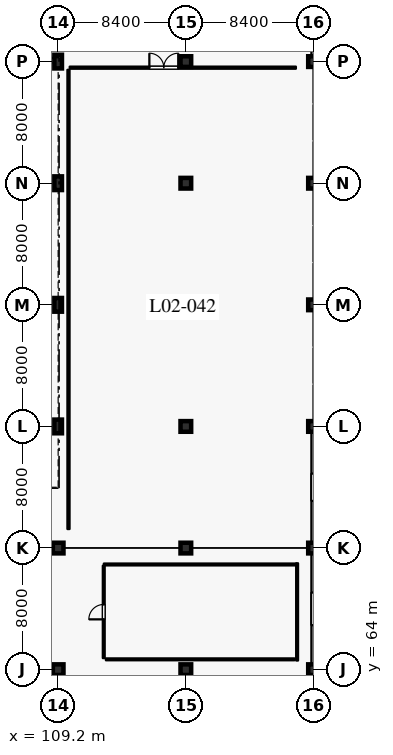
"""IFC4 building model, lengths in metres.
Left out: names, types, materials, properties, quantities, classifications, styles, units other than length and angle.
Written with IfcOpenShell. Run it as: python <this file> out.ifc"""

import sys

from ifc_helpers import new_model, si_unit, direction, frame, frame_2d, origin, origin_2d, place, context, subcontext, project, spatial, rectangle, hollow_rectangle, extrude, element, fill, save


model = new_model("IFC4")
c1 = context("Model", 3, precision=1e-05, world=origin(), true_north=direction((0.0, 1.0)))
c2 = subcontext(c1, "Body", "Model", "MODEL_VIEW")
j1 = project(units=[si_unit("LENGTHUNIT", "METRE"), si_unit("PLANEANGLEUNIT", "RADIAN")], contexts=[c1])
p1 = place(None, origin())
s1 = spatial("IfcSite", under=j1, at=p1, CompositionType="ELEMENT")
p2 = place(p1, origin())
s2 = spatial("IfcBuilding", under=s1, at=p2, CompositionType="ELEMENT")
p3 = place(p2, frame((0.0, 0.0, 11.4)))
s3 = spatial("IfcBuildingStorey", under=s2, at=p3, CompositionType="ELEMENT", Elevation=11.4)
for number, where, z_axis, x_axis in (
    (1, (109.2, 64.0, 0.0), (0.0, 0.0, 1.0), (1.0, 0.0, 0.0)),
    (2, (109.2, 72.0, 0.0), (0.0, 0.0, 1.0), (1.0, 0.0, 0.0)),
):
    element("IfcColumn", number, at=place(p3, frame(where, z_axis=z_axis, x_axis=x_axis)), inside=s3, PredefinedType="COLUMN", context=c2, shape_type="SweptSolid", body=[
        extrude(rectangle(XDim=0.7, YDim=0.7, at=origin_2d()), origin(), (0.0, 0.0, 1.0), 4.8),
    ])
for number, where, z_axis, x_axis in (
    (3, (109.2, 80.0, 0.0), (0.0, 0.0, 1.0), (1.0, 0.0, 0.0)),
    (4, (109.2, 88.0, 0.0), (0.0, 0.0, 1.0), (1.0, 0.0, 0.0)),
    (5, (109.2, 96.0, 0.0), (0.0, 0.0, 1.0), (1.0, 0.0, 0.0)),
    (6, (109.2, 104.0, 0.0), (0.0, 0.0, 1.0), (1.0, 0.0, 0.0)),
):
    element("IfcColumn", number, at=place(p3, frame(where, z_axis=z_axis, x_axis=x_axis)), inside=s3, PredefinedType="COLUMN", context=c2, shape_type="SweptSolid", body=[
        extrude(hollow_rectangle(XDim=0.5, YDim=0.9, WallThickness=0.024, at=origin_2d()), origin(), (0.0, 0.0, 1.0), 4.8),
    ])
for number, where, z_axis, x_axis in (
    (7, (117.6, 64.0, 0.0), (0.0, 0.0, 1.0), (1.0, 0.0, 0.0)),
    (8, (117.6, 72.0, 0.0), (0.0, 0.0, 1.0), (1.0, 0.0, 0.0)),
    (9, (117.6, 80.0, 0.0), (0.0, 0.0, 1.0), (1.0, 0.0, 0.0)),
    (10, (117.6, 88.0, 0.0), (0.0, 0.0, 1.0), (1.0, 0.0, 0.0)),
    (11, (117.6, 96.0, 0.0), (0.0, 0.0, 1.0), (1.0, 0.0, 0.0)),
    (12, (117.6, 104.0, 0.0), (0.0, 0.0, 1.0), (1.0, 0.0, 0.0)),
    (13, (126.0, 64.0, 0.0), (0.0, 0.0, 1.0), (1.0, 0.0, 0.0)),
    (14, (126.0, 72.0, 0.0), (0.0, 0.0, 1.0), (1.0, 0.0, 0.0)),
    (15, (126.0, 80.0, 0.0), (0.0, 0.0, 1.0), (1.0, 0.0, 0.0)),
    (16, (126.0, 88.0, 0.0), (0.0, 0.0, 1.0), (1.0, 0.0, 0.0)),
    (17, (126.0, 96.0, 0.0), (0.0, 0.0, 1.0), (1.0, 0.0, 0.0)),
    (18, (126.0, 104.0, 0.0), (0.0, 0.0, 1.0), (1.0, 0.0, 0.0)),
):
    element("IfcColumn", number, at=place(p3, frame(where, z_axis=z_axis, x_axis=x_axis)), inside=s3, PredefinedType="COLUMN", context=c2, shape_type="SweptSolid", body=[
        extrude(rectangle(XDim=0.7, YDim=0.7, at=origin_2d()), origin(), (0.0, 0.0, 1.0), 4.8),
    ])
p4 = place(p3, frame((126.0, 79.65, 0.0), z_axis=(0.0, 0.0, 1.0), x_axis=(0.0, -1.0, 0.0)))
e19 = element("IfcWall", 19, at=p4, inside=s3, PredefinedType="SOLIDWALL", context=c2, shape_type="SweptSolid", body=[
    extrude(rectangle(XDim=7.3, YDim=0.28, at=frame_2d((3.65, 0.0))), origin(), (0.0, 0.0, 1.0), 4.1),
])
p5 = place(p4, frame((2.75, 0.0, 1.05)))
e20 = element("IfcOpeningElement", 20, at=p5, cuts=e19, PredefinedType="OPENING", context=c2, shape_type="SweptSolid", body=[
    extrude(rectangle(XDim=1.8, YDim=1.7, at=frame_2d((0.9, 0.85))), frame((0.0, 0.15, 0.0), z_axis=(0.0, -1.0, 0.0), x_axis=(1.0, 0.0, 0.0)), (0.0, 0.0, 1.0), 0.3),
])
p6 = place(p3, frame((126.0, 111.65, 0.0), z_axis=(0.0, 0.0, 1.0), x_axis=(0.0, -1.0, 0.0)))
e21 = element("IfcWall", 21, at=p6, inside=s3, PredefinedType="SOLIDWALL", context=c2, shape_type="SweptSolid", body=[
    extrude(rectangle(XDim=7.3, YDim=0.28, at=frame_2d((3.65, 0.0))), origin(), (0.0, 0.0, 1.0), 4.05),
])
p7 = place(p6, frame((2.65, 0.0, 1.05)))
e22 = element("IfcOpeningElement", 22, at=p7, cuts=e21, PredefinedType="OPENING", context=c2, shape_type="SweptSolid", body=[
    extrude(rectangle(XDim=2.0, YDim=1.75, at=frame_2d((1.0, 0.875))), frame((0.0, 0.15, 0.0), z_axis=(0.0, -1.0, 0.0), x_axis=(1.0, 0.0, 0.0)), (0.0, 0.0, 1.0), 0.3),
])
p8 = place(p3, frame((126.0, 71.65, 0.0), z_axis=(0.0, 0.0, 1.0), x_axis=(0.0, -1.0, 0.0)))
e23 = element("IfcWall", 23, at=p8, inside=s3, PredefinedType="SOLIDWALL", context=c2, shape_type="SweptSolid", body=[
    extrude(rectangle(XDim=7.3, YDim=0.28, at=frame_2d((3.65, 0.0))), origin(), (0.0, 0.0, 1.0), 4.1),
])
p9 = place(p8, frame((2.575, 0.0, 1.0)))
e24 = element("IfcOpeningElement", 24, at=p9, cuts=e23, PredefinedType="OPENING", context=c2, shape_type="SweptSolid", body=[
    extrude(rectangle(XDim=2.15, YDim=2.1, at=frame_2d((1.075, 1.05))), frame((0.0, 0.15, 0.0), z_axis=(0.0, -1.0, 0.0), x_axis=(1.0, 0.0, 0.0)), (0.0, 0.0, 1.0), 0.3),
])
p10 = place(p3, frame((126.0, 63.65, 0.0), z_axis=(0.0, 0.0, 1.0), x_axis=(0.0, -1.0, 0.0)))
e25 = element("IfcWall", 25, at=p10, inside=s3, PredefinedType="SOLIDWALL", context=c2, shape_type="SweptSolid", body=[
    extrude(rectangle(XDim=7.3, YDim=0.28, at=frame_2d((3.65, 0.0))), origin(), (0.0, 0.0, 1.0), 4.5),
])
p11 = place(p10, frame((2.75, 0.0, 1.0)))
e26 = element("IfcOpeningElement", 26, at=p11, cuts=e25, PredefinedType="OPENING", context=c2, shape_type="SweptSolid", body=[
    extrude(rectangle(XDim=1.8, YDim=1.7, at=frame_2d((0.9, 0.85))), frame((0.0, 0.15, 0.0), z_axis=(0.0, -1.0, 0.0), x_axis=(1.0, 0.0, 0.0)), (0.0, 0.0, 1.0), 0.3),
])
p12 = place(p3, frame((109.96, 103.6, 0.0), z_axis=(0.0, 0.0, 1.0), x_axis=(1.0, 0.0, 0.0)))
e27 = element("IfcWall", 27, at=p12, inside=s3, PredefinedType="PARTITIONING", context=c2, shape_type="SweptSolid", body=[
    extrude(rectangle(XDim=14.88, YDim=0.14, at=frame_2d((7.44, 0.0))), origin(), (0.0, 0.0, 1.0), 4.535),
])
p13 = place(p12, frame((5.24, 0.0, 0.0)))
e28 = element("IfcOpeningElement", 28, at=p13, cuts=e27, PredefinedType="OPENING", context=c2, shape_type="SweptSolid", body=[
    extrude(rectangle(XDim=1.9, YDim=2.4, at=frame_2d((0.95, 1.2))), frame((0.0, 0.08, 0.0), z_axis=(0.0, -1.0, 0.0), x_axis=(1.0, 0.0, 0.0)), (0.0, 0.0, 1.0), 0.16),
])
p14 = place(p3, frame((109.88, 73.25, 0.0), z_axis=(0.0, 0.0, 1.0), x_axis=(0.0, 1.0, 0.0)))
e29 = element("IfcWall", 29, at=p14, inside=s3, PredefinedType="PARTITIONING", context=c2, shape_type="SweptSolid", body=[
    extrude(rectangle(XDim=30.21, YDim=0.14, at=frame_2d((15.105, 0.0))), origin(), (0.0, 0.0, 1.0), 4.535),
])
p15 = place(p3, frame((112.2, 64.76, 0.0), z_axis=(0.0, 0.0, 1.0), x_axis=(0.0, 1.0, 0.0)))
e30 = element("IfcWall", 30, at=p15, inside=s3, PredefinedType="PARTITIONING", context=c2, shape_type="SweptSolid", body=[
    extrude(rectangle(XDim=6.08, YDim=0.125, at=frame_2d((3.04, 0.0))), origin(), (0.0, 0.0, 1.0), 4.535),
])
p16 = place(p15, frame((2.55, 0.0, 0.0)))
e31 = element("IfcOpeningElement", 31, at=p16, cuts=e30, PredefinedType="OPENING", context=c2, shape_type="SweptSolid", body=[
    extrude(rectangle(XDim=0.98, YDim=2.15, at=frame_2d((0.49, 1.075))), frame((0.0, 0.073, 0.0), z_axis=(0.0, -1.0, 0.0), x_axis=(1.0, 0.0, 0.0)), (0.0, 0.0, 1.0), 0.145),
])
p17 = place(p3, frame((112.34, 64.68, 0.0), z_axis=(0.0, 0.0, 1.0), x_axis=(1.0, 0.0, 0.0)))
e32 = element("IfcWall", 32, at=p17, inside=s3, PredefinedType="PARTITIONING", context=c2, shape_type="SweptSolid", body=[
    extrude(rectangle(XDim=12.41, YDim=0.125, at=frame_2d((6.205, 0.0))), origin(), (0.0, 0.0, 1.0), 4.535),
])
p18 = place(p3, frame((124.92, 64.6, 0.0), z_axis=(0.0, 0.0, 1.0), x_axis=(0.0, 1.0, 0.0)))
e33 = element("IfcWall", 33, at=p18, inside=s3, PredefinedType="PARTITIONING", context=c2, shape_type="SweptSolid", body=[
    extrude(rectangle(XDim=6.4, YDim=0.125, at=frame_2d((3.2, 0.0))), origin(), (0.0, 0.0, 1.0), 4.535),
])
p19 = place(p3, frame((112.204, 70.92, 0.0), z_axis=(0.0, 0.0, 1.0), x_axis=(1.0, 0.0, 0.0)))
e34 = element("IfcWall", 34, at=p19, inside=s3, PredefinedType="PARTITIONING", context=c2, shape_type="SweptSolid", body=[
    extrude(rectangle(XDim=12.654, YDim=0.125, at=frame_2d((6.327, 0.0))), origin(), (0.0, 0.0, 1.0), 4.535),
])
p20 = place(p5, origin())
e35 = element("IfcWindow", 35, at=p20, inside=s3, PartitioningType="DOUBLE_PANEL_VERTICAL", PredefinedType="WINDOW", context=c2, shape_type="SweptSolid", body=[
    extrude(rectangle(XDim=1.8, YDim=1.7, at=frame_2d((0.9, 0.85))), frame((0.0, 0.03, 0.0), z_axis=(0.0, -1.0, 0.0), x_axis=(1.0, 0.0, 0.0)), (0.0, 0.0, 1.0), 0.06),
])
fill(e20, e35)
p21 = place(p9, origin())
e36 = element("IfcWindow", 36, at=p21, inside=s3, PartitioningType="DOUBLE_PANEL_VERTICAL", PredefinedType="WINDOW", context=c2, shape_type="SweptSolid", body=[
    extrude(rectangle(XDim=2.15, YDim=2.1, at=frame_2d((1.075, 1.05))), frame((0.0, 0.03, 0.0), z_axis=(0.0, -1.0, 0.0), x_axis=(1.0, 0.0, 0.0)), (0.0, 0.0, 1.0), 0.06),
])
fill(e24, e36)
p22 = place(p13, origin())
e37 = element("IfcDoor", 37, at=p22, inside=s3, OperationType="DOUBLE_DOOR_SINGLE_SWING", PredefinedType="DOOR", context=c2, shape_type="SweptSolid", body=[
    extrude(rectangle(XDim=1.9, YDim=2.4, at=frame_2d((0.95, 1.2))), frame((0.0, 0.025, 0.0), z_axis=(0.0, -1.0, 0.0), x_axis=(1.0, 0.0, 0.0)), (0.0, 0.0, 1.0), 0.05),
])
fill(e28, e37)
p23 = place(p16, origin())
e38 = element("IfcDoor", 38, at=p23, inside=s3, OperationType="SINGLE_SWING_LEFT", PredefinedType="DOOR", context=c2, shape_type="SweptSolid", body=[
    extrude(rectangle(XDim=0.98, YDim=2.15, at=frame_2d((0.49, 1.075))), frame((0.0, 0.025, 0.0), z_axis=(0.0, -1.0, 0.0), x_axis=(1.0, 0.0, 0.0)), (0.0, 0.0, 1.0), 0.05),
])
fill(e31, e38)
save(model, sys.argv[1])
